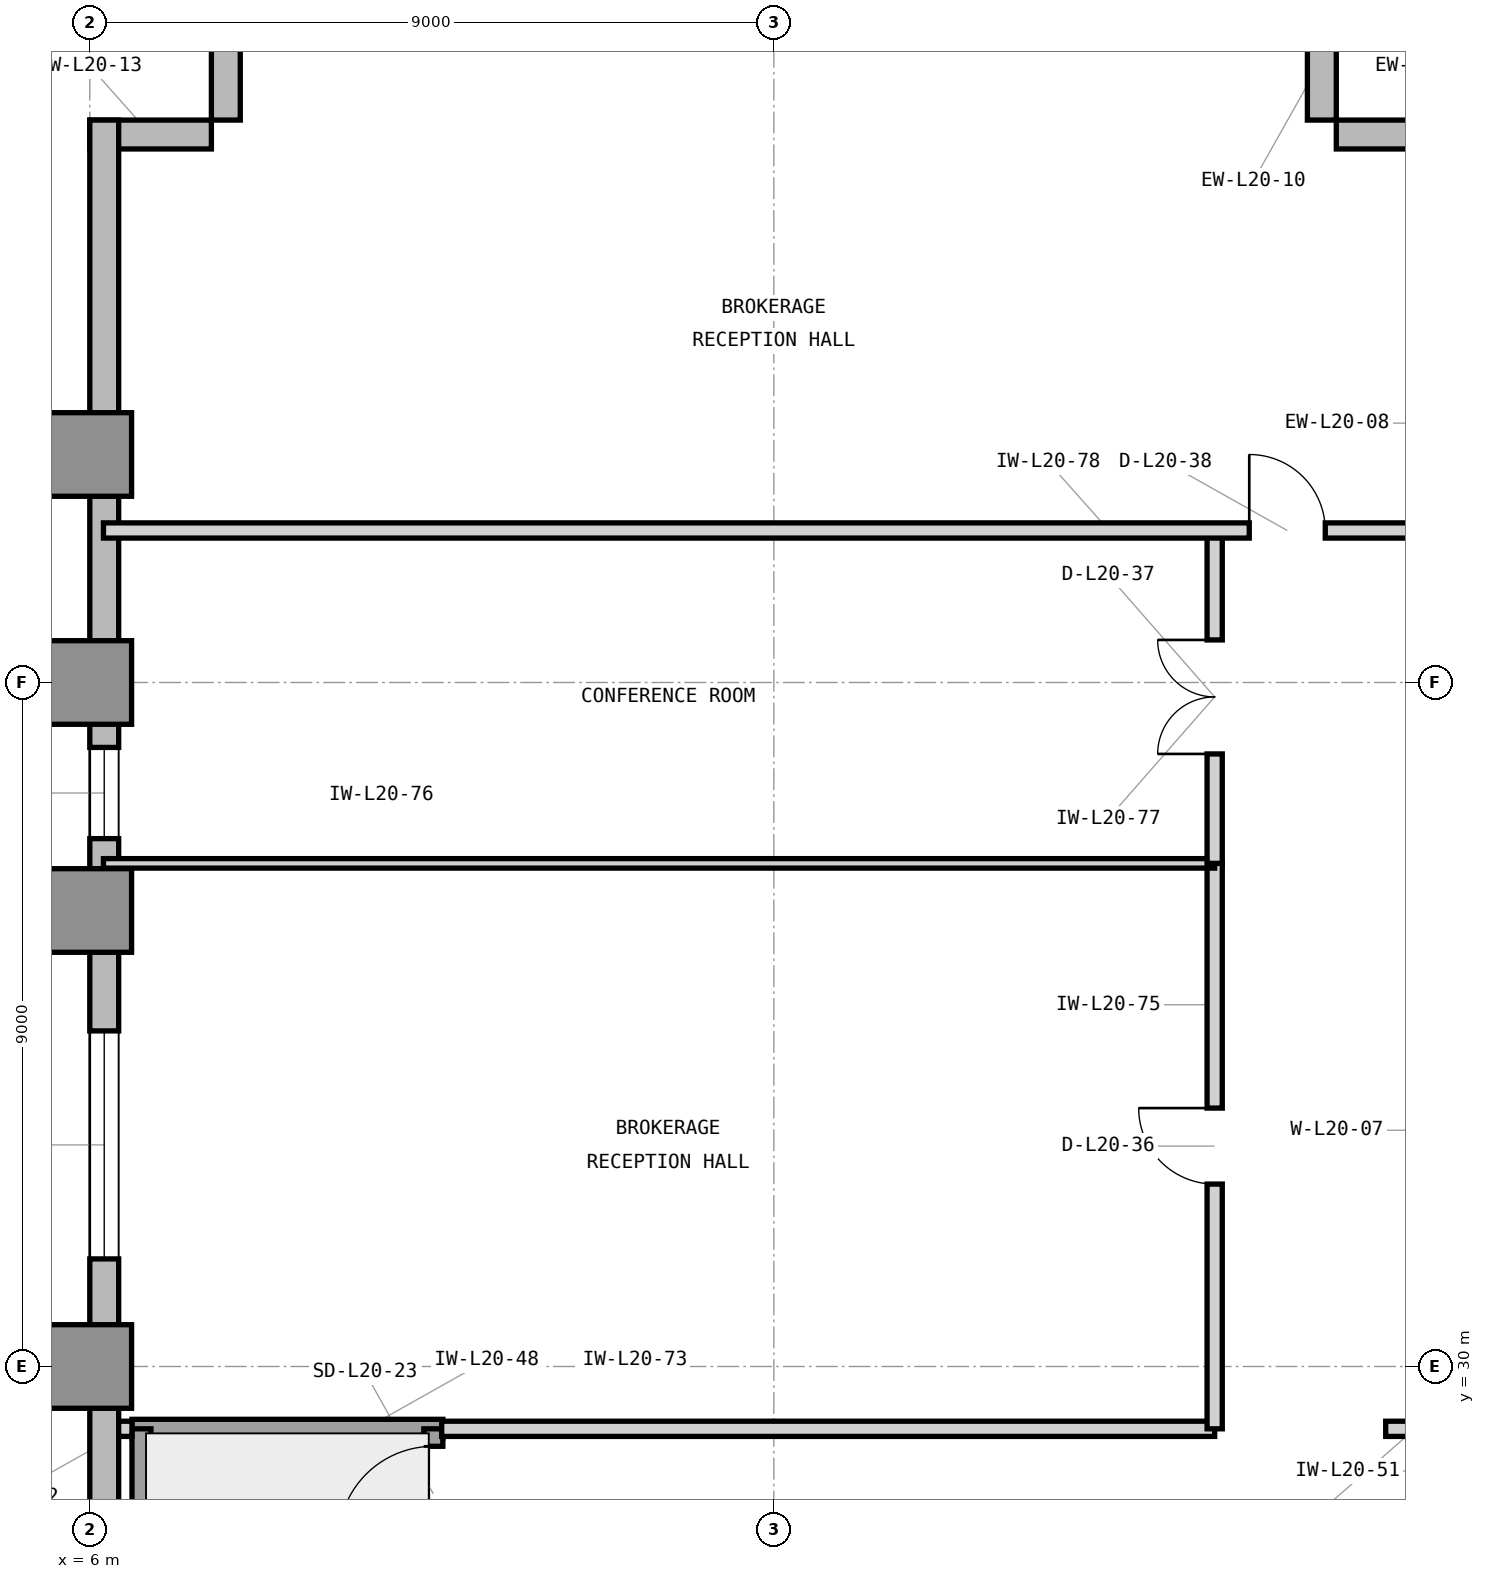
"""IFC4 building model, lengths in metres.
Left out: names, types, materials, properties, quantities, classifications, styles, units other than length and angle.
Written with IfcOpenShell. Run it as: python <this file> out.ifc"""

import sys

from ifc_helpers import new_model, si_unit, direction, frame, frame_2d, origin, origin_2d, place, context, subcontext, project, spatial, rectangle, extrude, element, fill, save


model = new_model("IFC4")
c1 = context("Model", 3, precision=1e-05, world=origin(), true_north=direction((0.0, 1.0)))
c2 = subcontext(c1, "Body", "Model", "MODEL_VIEW")
j1 = project(units=[si_unit("LENGTHUNIT", "METRE"), si_unit("PLANEANGLEUNIT", "RADIAN")], contexts=[c1])
p1 = place(None, origin())
s1 = spatial("IfcSite", under=j1, at=p1, CompositionType="ELEMENT")
p2 = place(p1, origin())
s2 = spatial("IfcBuilding", under=s1, at=p2, CompositionType="ELEMENT")
p3 = place(p2, frame((0.0, 0.0, 89.1)))
s3 = spatial("IfcBuildingStorey", under=s2, at=p3, CompositionType="ELEMENT", Elevation=89.1)
for number, where, z_axis, x_axis in (
    (1, (6.0, 30.0, 0.0), (0.0, 0.0, 1.0), (1.0, 0.0, 0.0)),
    (2, (6.0, 36.0, 0.0), (0.0, 0.0, 1.0), (1.0, 0.0, 0.0)),
    (3, (6.0, 39.0, 0.0), (0.0, 0.0, 1.0), (1.0, 0.0, 0.0)),
    (4, (6.0, 42.0, 0.0), (0.0, 0.0, 1.0), (1.0, 0.0, 0.0)),
):
    element("IfcColumn", number, at=place(p3, frame(where, z_axis=z_axis, x_axis=x_axis)), inside=s3, PredefinedType="COLUMN", context=c2, shape_type="SweptSolid", body=[
        extrude(rectangle(XDim=1.1, YDim=1.1, at=origin_2d()), origin(), (0.0, 0.0, 1.0), 4.2),
    ])
for number, where, z_axis, x_axis in (
    (5, (24.0, 46.21, 0.0), (0.0, 0.0, 1.0), (-1.0, 0.0, 0.0)),
    (6, (22.21, 46.4, 0.0), (0.0, 0.0, 1.0), (0.0, 1.0, 0.0)),
    (7, (7.79, 48.0, 0.0), (0.0, 0.0, 1.0), (0.0, -1.0, 0.0)),
    (8, (7.6, 46.21, 0.0), (0.0, 0.0, 1.0), (-1.0, 0.0, 0.0)),
):
    element("IfcWall", number, at=place(p3, frame(where, z_axis=z_axis, x_axis=x_axis)), inside=s3, PredefinedType="STANDARD", context=c2, shape_type="SweptSolid", body=[
        extrude(rectangle(XDim=1.6, YDim=0.38, at=frame_2d((0.8, 0.0))), origin(), (0.0, 0.0, 1.0), 4.0),
    ])
p4 = place(p3, frame((6.19, 46.4, 0.0), z_axis=(0.0, 0.0, 1.0), x_axis=(0.0, -1.0, 0.0)))
e9 = element("IfcWall", 9, at=p4, inside=s3, PredefinedType="STANDARD", context=c2, shape_type="SweptSolid", body=[
    extrude(rectangle(XDim=25.5, YDim=0.38, at=frame_2d((12.75, 0.0))), origin(), (0.0, 0.0, 1.0), 4.0),
])
p5 = place(p4, frame((11.984, 0.0, 0.7)))
e10 = element("IfcOpeningElement", 10, at=p5, cuts=e9, PredefinedType="OPENING", context=c2, shape_type="SweptSolid", body=[
    extrude(rectangle(XDim=3.0, YDim=2.6, at=frame_2d((1.5, 1.3))), frame((0.0, 0.2, 0.0), z_axis=(0.0, -1.0, 0.0), x_axis=(1.0, 0.0, 0.0)), (0.0, 0.0, 1.0), 0.4),
])
p6 = place(p4, frame((8.254, 0.0, 0.85)))
e11 = element("IfcOpeningElement", 11, at=p6, cuts=e9, PredefinedType="OPENING", context=c2, shape_type="SweptSolid", body=[
    extrude(rectangle(XDim=1.2, YDim=2.25, at=frame_2d((0.6, 1.125))), frame((0.0, 0.2, 0.0), z_axis=(0.0, -1.0, 0.0), x_axis=(1.0, 0.0, 0.0)), (0.0, 0.0, 1.0), 0.4),
])
p7 = place(p3, frame((6.555, 29.18, 0.0), z_axis=(0.0, 0.0, 1.0), x_axis=(1.0, 0.0, 0.0)))
e12 = element("IfcWall", 12, at=p7, inside=s3, PredefinedType="SHEAR", context=c2, shape_type="SweptSolid", body=[
    extrude(rectangle(XDim=4.09, YDim=0.25, at=frame_2d((2.045, 0.0))), origin(), (0.0, 0.0, 1.0), 4.2),
])
p8 = place(p3, frame((6.68, 21.68, 0.0), z_axis=(0.0, 0.0, 1.0), x_axis=(0.0, 1.0, 0.0)))
e13 = element("IfcWall", 13, at=p8, inside=s3, PredefinedType="SHEAR", context=c2, shape_type="SweptSolid", body=[
    extrude(rectangle(XDim=7.5, YDim=0.25, at=frame_2d((3.75, 0.0))), origin(), (0.0, 0.0, 1.0), 4.2),
])
p9 = place(p3, frame((10.52, 21.68, 0.0), z_axis=(0.0, 0.0, 1.0), x_axis=(0.0, 1.0, 0.0)))
e14 = element("IfcWall", 14, at=p9, inside=s3, PredefinedType="SHEAR", context=c2, shape_type="SweptSolid", body=[
    extrude(rectangle(XDim=7.5, YDim=0.25, at=frame_2d((3.75, 0.0))), origin(), (0.0, 0.0, 1.0), 4.2),
])
p10 = place(p9, frame((6.02, 0.0, 0.0)))
e15 = element("IfcOpeningElement", 15, at=p10, cuts=e14, PredefinedType="OPENING", context=c2, shape_type="SweptSolid", body=[
    extrude(rectangle(XDim=1.25, YDim=2.2, at=frame_2d((0.625, 1.1))), frame((0.0, 0.135, 0.0), z_axis=(0.0, -1.0, 0.0), x_axis=(1.0, 0.0, 0.0)), (0.0, 0.0, 1.0), 0.27),
])
p11 = place(p3, frame((6.38, 29.18, 0.0), z_axis=(0.0, 0.0, 1.0), x_axis=(1.0, 0.0, 0.0)))
e16 = element("IfcWall", 16, at=p11, inside=s3, PredefinedType="PARTITIONING", context=c2, shape_type="SweptSolid", body=[
    extrude(rectangle(XDim=0.175, YDim=0.2, at=frame_2d((0.087, 0.0))), origin(), (0.0, 0.0, 1.0), 3.93),
])
p12 = place(p3, frame((10.63, 29.18, 0.0), z_axis=(0.0, 0.0, 1.0), x_axis=(1.0, 0.0, 0.0)))
e17 = element("IfcWall", 17, at=p12, inside=s3, PredefinedType="PARTITIONING", context=c2, shape_type="SweptSolid", body=[
    extrude(rectangle(XDim=10.17, YDim=0.2, at=frame_2d((5.085, 0.0))), origin(), (0.0, 0.0, 1.0), 3.93),
])
p13 = place(p3, frame((23.05, 29.18, 0.0), z_axis=(0.0, 0.0, 1.0), x_axis=(1.0, 0.0, 0.0)))
e18 = element("IfcWall", 18, at=p13, inside=s3, PredefinedType="PARTITIONING", context=c2, shape_type="SweptSolid", body=[
    extrude(rectangle(XDim=0.77, YDim=0.2, at=frame_2d((0.385, 0.0))), origin(), (0.0, 0.0, 1.0), 3.93),
])
p14 = place(p3, frame((20.8, 29.18, 0.0), z_axis=(0.0, 0.0, 1.0), x_axis=(0.0, 1.0, 0.0)))
e19 = element("IfcWall", 19, at=p14, inside=s3, PredefinedType="PARTITIONING", context=c2, shape_type="SweptSolid", body=[
    extrude(rectangle(XDim=7.44, YDim=0.2, at=frame_2d((3.72, 0.0))), origin(), (0.0, 0.0, 1.0), 3.93),
])
p15 = place(p14, frame((3.22, 0.0, 0.0)))
e20 = element("IfcOpeningElement", 20, at=p15, cuts=e19, PredefinedType="OPENING", context=c2, shape_type="SweptSolid", body=[
    extrude(rectangle(XDim=1.0, YDim=2.15, at=frame_2d((0.5, 1.075))), frame((0.0, 0.11, 0.0), z_axis=(0.0, -1.0, 0.0), x_axis=(1.0, 0.0, 0.0)), (0.0, 0.0, 1.0), 0.22),
])
p16 = place(p3, frame((6.18, 36.62, 0.0), z_axis=(0.0, 0.0, 1.0), x_axis=(1.0, 0.0, 0.0)))
e21 = element("IfcWall", 21, at=p16, inside=s3, PredefinedType="PARTITIONING", context=c2, shape_type="SweptSolid", body=[
    extrude(rectangle(XDim=14.62, YDim=0.125, at=frame_2d((7.31, 0.0))), origin(), (0.0, 0.0, 1.0), 3.93),
])
p17 = place(p3, frame((20.8, 36.62, 0.0), z_axis=(0.0, 0.0, 1.0), x_axis=(0.0, 1.0, 0.0)))
e22 = element("IfcWall", 22, at=p17, inside=s3, PredefinedType="PARTITIONING", context=c2, shape_type="SweptSolid", body=[
    extrude(rectangle(XDim=4.38, YDim=0.2, at=frame_2d((2.19, 0.0))), origin(), (0.0, 0.0, 1.0), 3.93),
])
p18 = place(p17, frame((1.44, 0.0, 0.0)))
e23 = element("IfcOpeningElement", 23, at=p18, cuts=e22, PredefinedType="OPENING", context=c2, shape_type="SweptSolid", body=[
    extrude(rectangle(XDim=1.5, YDim=2.3, at=frame_2d((0.75, 1.15))), frame((0.0, 0.11, 0.0), z_axis=(0.0, -1.0, 0.0), x_axis=(1.0, 0.0, 0.0)), (0.0, 0.0, 1.0), 0.22),
])
p19 = place(p3, frame((6.18, 41.0, 0.0), z_axis=(0.0, 0.0, 1.0), x_axis=(1.0, 0.0, 0.0)))
e24 = element("IfcWall", 24, at=p19, inside=s3, PredefinedType="PARTITIONING", context=c2, shape_type="SweptSolid", body=[
    extrude(rectangle(XDim=17.64, YDim=0.2, at=frame_2d((8.82, 0.0))), origin(), (0.0, 0.0, 1.0), 3.93),
])
p20 = place(p19, frame((15.075, 0.0, 0.0)))
e25 = element("IfcOpeningElement", 25, at=p20, cuts=e24, PredefinedType="OPENING", context=c2, shape_type="SweptSolid", body=[
    extrude(rectangle(XDim=1.0, YDim=2.15, at=frame_2d((0.5, 1.075))), frame((0.0, 0.11, 0.0), z_axis=(0.0, -1.0, 0.0), x_axis=(1.0, 0.0, 0.0)), (0.0, 0.0, 1.0), 0.22),
])
p21 = place(p10, origin())
e26 = element("IfcDoor", 26, at=p21, inside=s3, OperationType="SINGLE_SWING_LEFT", PredefinedType="DOOR", context=c2, shape_type="SweptSolid", body=[
    extrude(rectangle(XDim=1.25, YDim=2.2, at=frame_2d((0.625, 1.1))), frame((0.0, 0.025, 0.0), z_axis=(0.0, -1.0, 0.0), x_axis=(1.0, 0.0, 0.0)), (0.0, 0.0, 1.0), 0.05),
])
fill(e15, e26)
p22 = place(p15, origin())
e27 = element("IfcDoor", 27, at=p22, inside=s3, OperationType="SINGLE_SWING_RIGHT", PredefinedType="DOOR", context=c2, shape_type="SweptSolid", body=[
    extrude(rectangle(XDim=1.0, YDim=2.15, at=frame_2d((0.5, 1.075))), frame((0.0, 0.025, 0.0), z_axis=(0.0, -1.0, 0.0), x_axis=(1.0, 0.0, 0.0)), (0.0, 0.0, 1.0), 0.05),
])
fill(e20, e27)
p23 = place(p18, origin())
e28 = element("IfcDoor", 28, at=p23, inside=s3, OperationType="DOUBLE_DOOR_SINGLE_SWING", PredefinedType="DOOR", context=c2, shape_type="SweptSolid", body=[
    extrude(rectangle(XDim=1.5, YDim=2.3, at=frame_2d((0.75, 1.15))), frame((0.0, 0.025, 0.0), z_axis=(0.0, -1.0, 0.0), x_axis=(1.0, 0.0, 0.0)), (0.0, 0.0, 1.0), 0.05),
])
fill(e23, e28)
p24 = place(p20, origin())
e29 = element("IfcDoor", 29, at=p24, inside=s3, OperationType="SINGLE_SWING_LEFT", PredefinedType="DOOR", context=c2, shape_type="SweptSolid", body=[
    extrude(rectangle(XDim=1.0, YDim=2.15, at=frame_2d((0.5, 1.075))), frame((0.0, 0.025, 0.0), z_axis=(0.0, -1.0, 0.0), x_axis=(1.0, 0.0, 0.0)), (0.0, 0.0, 1.0), 0.05),
])
fill(e25, e29)
p25 = place(p5, origin())
e30 = element("IfcWindow", 30, at=p25, inside=s3, PartitioningType="SINGLE_PANEL", PredefinedType="WINDOW", context=c2, shape_type="SweptSolid", body=[
    extrude(rectangle(XDim=3.0, YDim=2.6, at=frame_2d((1.5, 1.3))), frame((0.0, 0.11, 0.0), z_axis=(0.0, -1.0, 0.0), x_axis=(1.0, 0.0, 0.0)), (0.0, 0.0, 1.0), 0.06),
])
fill(e10, e30)
p26 = place(p6, origin())
e31 = element("IfcWindow", 31, at=p26, inside=s3, PartitioningType="SINGLE_PANEL", PredefinedType="WINDOW", context=c2, shape_type="SweptSolid", body=[
    extrude(rectangle(XDim=1.2, YDim=2.25, at=frame_2d((0.6, 1.125))), frame((0.0, 0.11, 0.0), z_axis=(0.0, -1.0, 0.0), x_axis=(1.0, 0.0, 0.0)), (0.0, 0.0, 1.0), 0.06),
])
fill(e11, e31)
save(model, sys.argv[1])
